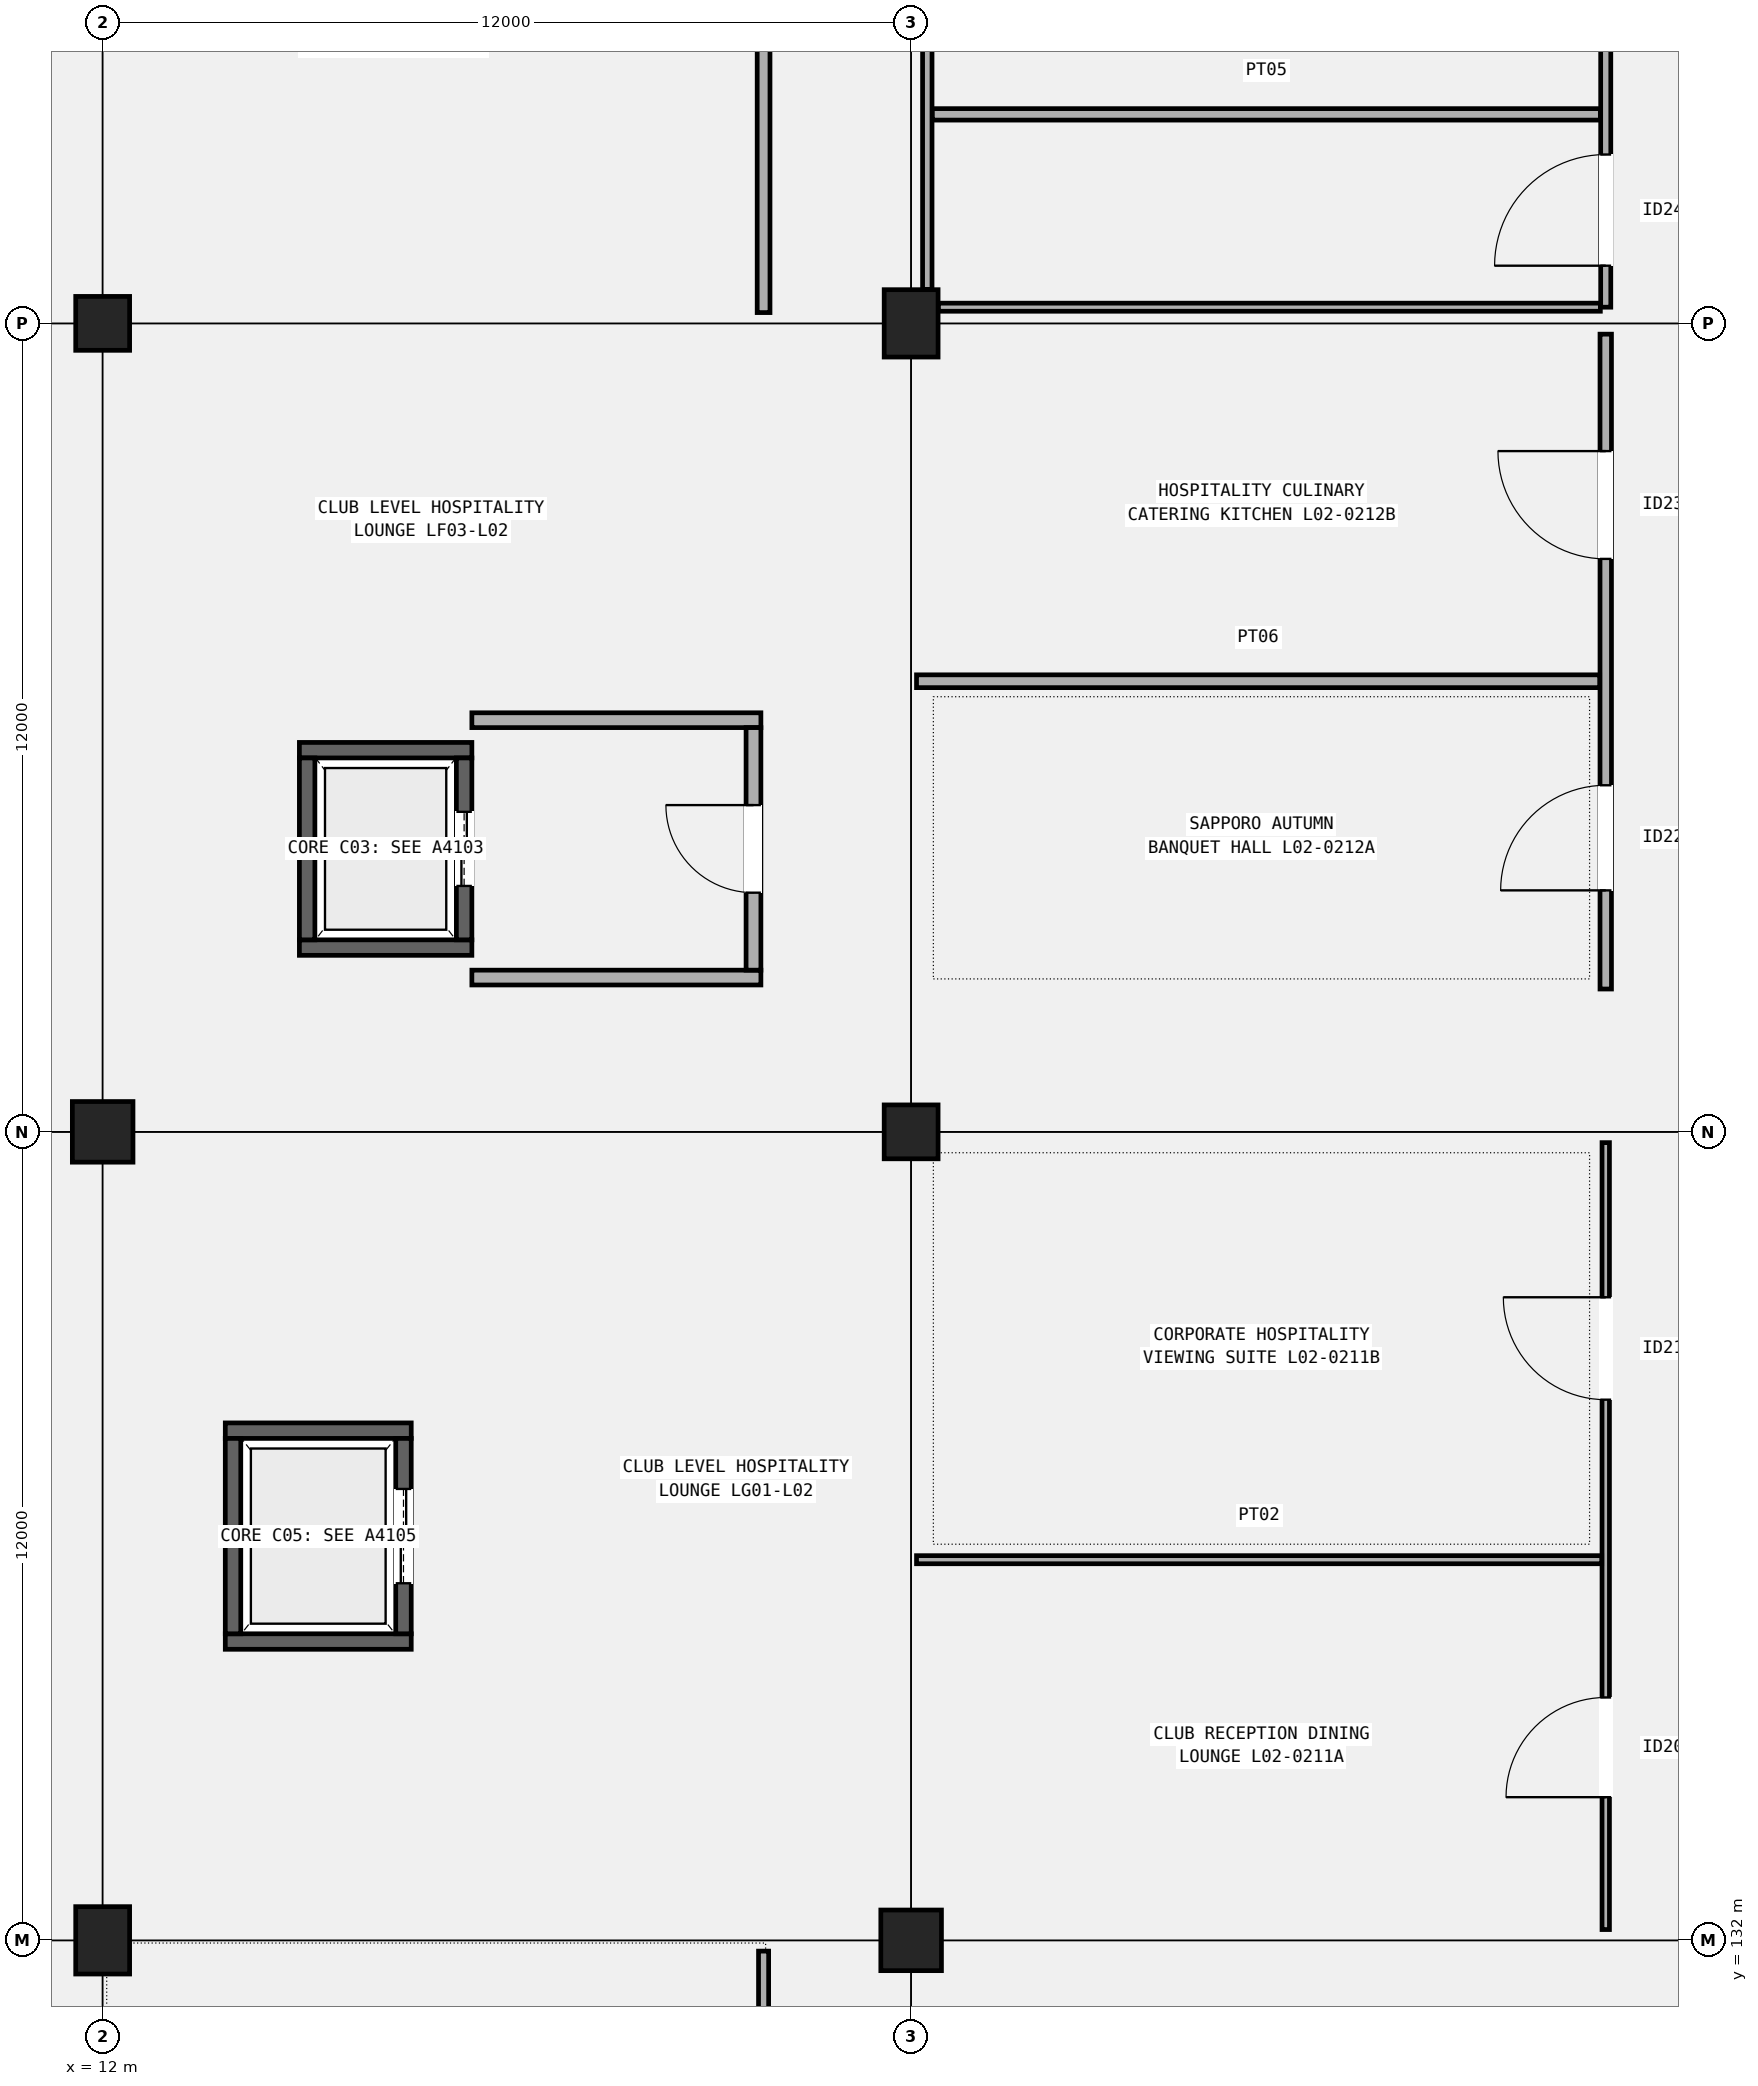
"""IFC4 building model, lengths in metres.
Left out: names, types, materials, properties, quantities, classifications, styles, units other than length and angle.
Written with IfcOpenShell. Run it as: python <this file> out.ifc"""

import sys

from ifc_helpers import new_model, si_unit, direction, frame, frame_2d, origin, origin_2d, place, context, subcontext, project, spatial, rectangle, extrude, element, fill, save


model = new_model("IFC4")
c1 = context("Model", 3, precision=1e-05, world=origin(), true_north=direction((0.0, 1.0)))
c2 = subcontext(c1, "Body", "Model", "MODEL_VIEW")
j1 = project(units=[si_unit("LENGTHUNIT", "METRE"), si_unit("PLANEANGLEUNIT", "RADIAN")], contexts=[c1])
p1 = place(None, origin())
s1 = spatial("IfcSite", under=j1, at=p1, CompositionType="ELEMENT")
p2 = place(p1, origin())
s2 = spatial("IfcBuilding", under=s1, at=p2, CompositionType="ELEMENT")
p3 = place(p2, frame((0.0, 0.0, 10.2)))
s3 = spatial("IfcBuildingStorey", under=s2, at=p3, CompositionType="ELEMENT", Elevation=10.2)
p4 = place(p3, frame((12.0, 132.0, 0.0), z_axis=(0.0, 0.0, 1.0), x_axis=(1.0, 0.0, 0.0)))
e1 = element("IfcColumn", 1, at=p4, inside=s3, PredefinedType="COLUMN", context=c2, shape_type="SweptSolid", body=[
    extrude(rectangle(XDim=0.8, YDim=1.0, at=origin_2d()), origin(), (0.0, 0.0, 1.0), 5.1),
])
p5 = place(p3, frame((12.0, 144.0, 0.0), z_axis=(0.0, 0.0, 1.0), x_axis=(1.0, 0.0, 0.0)))
e2 = element("IfcColumn", 2, at=p5, inside=s3, PredefinedType="COLUMN", context=c2, shape_type="SweptSolid", body=[
    extrude(rectangle(XDim=0.9, YDim=0.9, at=origin_2d()), origin(), (0.0, 0.0, 1.0), 5.1),
])
p6 = place(p3, frame((12.0, 156.0, 0.0), z_axis=(0.0, 0.0, 1.0), x_axis=(1.0, 0.0, 0.0)))
e3 = element("IfcColumn", 3, at=p6, inside=s3, PredefinedType="COLUMN", context=c2, shape_type="SweptSolid", body=[
    extrude(rectangle(XDim=0.8, YDim=0.8, at=origin_2d()), origin(), (0.0, 0.0, 1.0), 5.1),
])
p7 = place(p3, frame((24.0, 132.0, 0.0), z_axis=(0.0, 0.0, 1.0), x_axis=(1.0, 0.0, 0.0)))
e4 = element("IfcColumn", 4, at=p7, inside=s3, PredefinedType="COLUMN", context=c2, shape_type="SweptSolid", body=[
    extrude(rectangle(XDim=0.9, YDim=0.9, at=origin_2d()), origin(), (0.0, 0.0, 1.0), 5.1),
])
p8 = place(p3, frame((24.0, 144.0, 0.0), z_axis=(0.0, 0.0, 1.0), x_axis=(1.0, 0.0, 0.0)))
e5 = element("IfcColumn", 5, at=p8, inside=s3, PredefinedType="COLUMN", context=c2, shape_type="SweptSolid", body=[
    extrude(rectangle(XDim=0.8, YDim=0.8, at=origin_2d()), origin(), (0.0, 0.0, 1.0), 5.1),
])
p9 = place(p3, frame((24.0, 156.0, 0.0), z_axis=(0.0, 0.0, 1.0), x_axis=(1.0, 0.0, 0.0)))
e6 = element("IfcColumn", 6, at=p9, inside=s3, PredefinedType="COLUMN", context=c2, shape_type="SweptSolid", body=[
    extrude(rectangle(XDim=0.8, YDim=1.0, at=origin_2d()), origin(), (0.0, 0.0, 1.0), 5.1),
])
for number, where, z_axis, x_axis in (
    (7, (14.92, 146.735, 0.0), (0.0, 0.0, 1.0), (1.0, 0.0, 0.0)),
    (8, (14.92, 149.665, 0.0), (0.0, 0.0, 1.0), (1.0, 0.0, 0.0)),
):
    element("IfcWall", number, at=place(p3, frame(where, z_axis=z_axis, x_axis=x_axis)), inside=s3, PredefinedType="SHEAR", context=c2, shape_type="SweptSolid", body=[
        extrude(rectangle(XDim=2.56, YDim=0.23, at=frame_2d((1.28, 0.0))), origin(), (0.0, 0.0, 1.0), 4.82),
    ])
p10 = place(p3, frame((15.035, 146.85, 0.0), z_axis=(0.0, 0.0, 1.0), x_axis=(0.0, 1.0, 0.0)))
e9 = element("IfcWall", 9, at=p10, inside=s3, PredefinedType="SHEAR", context=c2, shape_type="SweptSolid", body=[
    extrude(rectangle(XDim=2.7, YDim=0.23, at=frame_2d((1.35, 0.0))), origin(), (0.0, 0.0, 1.0), 4.82),
])
p11 = place(p3, frame((17.365, 146.85, 0.0), z_axis=(0.0, 0.0, 1.0), x_axis=(0.0, 1.0, 0.0)))
e10 = element("IfcWall", 10, at=p11, inside=s3, PredefinedType="SHEAR", context=c2, shape_type="SweptSolid", body=[
    extrude(rectangle(XDim=2.7, YDim=0.23, at=frame_2d((1.35, 0.0))), origin(), (0.0, 0.0, 1.0), 4.82),
])
p12 = place(p11, frame((0.8, 0.0, 0.0)))
e11 = element("IfcOpeningElement", 11, at=p12, cuts=e10, PredefinedType="OPENING", context=c2, shape_type="SweptSolid", body=[
    extrude(rectangle(XDim=1.1, YDim=2.15, at=frame_2d((0.55, 1.075))), frame((0.0, 0.125, 0.0), z_axis=(0.0, -1.0, 0.0), x_axis=(1.0, 0.0, 0.0)), (0.0, 0.0, 1.0), 0.25),
])
for number, where, z_axis, x_axis in (
    (12, (17.48, 146.29, 0.0), (0.0, 0.0, 1.0), (1.0, 0.0, 0.0)),
    (13, (17.48, 150.11, 0.0), (0.0, 0.0, 1.0), (1.0, 0.0, 0.0)),
):
    element("IfcWall", number, at=place(p3, frame(where, z_axis=z_axis, x_axis=x_axis)), inside=s3, PredefinedType="SOLIDWALL", context=c2, shape_type="SweptSolid", body=[
        extrude(rectangle(XDim=4.29, YDim=0.22, at=frame_2d((2.145, 0.0))), origin(), (0.0, 0.0, 1.0), 4.22),
    ])
p13 = place(p3, frame((21.66, 146.4, 0.0), z_axis=(0.0, 0.0, 1.0), x_axis=(0.0, 1.0, 0.0)))
e14 = element("IfcWall", 14, at=p13, inside=s3, PredefinedType="SOLIDWALL", context=c2, shape_type="SweptSolid", body=[
    extrude(rectangle(XDim=3.6, YDim=0.22, at=frame_2d((1.8, 0.0))), origin(), (0.0, 0.0, 1.0), 4.22),
])
p14 = place(p13, frame((1.15, 0.0, 0.0)))
e15 = element("IfcOpeningElement", 15, at=p14, cuts=e14, PredefinedType="OPENING", context=c2, shape_type="SweptSolid", body=[
    extrude(rectangle(XDim=1.3, YDim=2.15, at=frame_2d((0.65, 1.075))), frame((0.0, 0.12, 0.0), z_axis=(0.0, -1.0, 0.0), x_axis=(1.0, 0.0, 0.0)), (0.0, 0.0, 1.0), 0.24),
])
for number, where, z_axis, x_axis in (
    (16, (13.82, 136.435, 0.0), (0.0, 0.0, 1.0), (1.0, 0.0, 0.0)),
    (17, (13.82, 139.565, 0.0), (0.0, 0.0, 1.0), (1.0, 0.0, 0.0)),
):
    element("IfcWall", number, at=place(p3, frame(where, z_axis=z_axis, x_axis=x_axis)), inside=s3, PredefinedType="SHEAR", context=c2, shape_type="SweptSolid", body=[
        extrude(rectangle(XDim=2.76, YDim=0.23, at=frame_2d((1.38, 0.0))), origin(), (0.0, 0.0, 1.0), 4.82),
    ])
p15 = place(p3, frame((13.935, 136.55, 0.0), z_axis=(0.0, 0.0, 1.0), x_axis=(0.0, 1.0, 0.0)))
e18 = element("IfcWall", 18, at=p15, inside=s3, PredefinedType="SHEAR", context=c2, shape_type="SweptSolid", body=[
    extrude(rectangle(XDim=2.9, YDim=0.23, at=frame_2d((1.45, 0.0))), origin(), (0.0, 0.0, 1.0), 4.82),
])
p16 = place(p3, frame((16.465, 136.55, 0.0), z_axis=(0.0, 0.0, 1.0), x_axis=(0.0, 1.0, 0.0)))
e19 = element("IfcWall", 19, at=p16, inside=s3, PredefinedType="SHEAR", context=c2, shape_type="SweptSolid", body=[
    extrude(rectangle(XDim=2.9, YDim=0.23, at=frame_2d((1.45, 0.0))), origin(), (0.0, 0.0, 1.0), 4.82),
])
p17 = place(p16, frame((0.75, 0.0, 0.0)))
e20 = element("IfcOpeningElement", 20, at=p17, cuts=e19, PredefinedType="OPENING", context=c2, shape_type="SweptSolid", body=[
    extrude(rectangle(XDim=1.4, YDim=2.25, at=frame_2d((0.7, 1.125))), frame((0.0, 0.125, 0.0), z_axis=(0.0, -1.0, 0.0), x_axis=(1.0, 0.0, 0.0)), (0.0, 0.0, 1.0), 0.25),
])
p18 = place(p3, frame((21.81, 120.16, 0.0), z_axis=(0.0, 0.0, 1.0), x_axis=(0.0, 1.0, 0.0)))
e21 = element("IfcWall", 21, at=p18, inside=s3, PredefinedType="PARTITIONING", context=c2, shape_type="SweptSolid", body=[
    extrude(rectangle(XDim=11.68, YDim=0.15, at=frame_2d((5.84, 0.0))), origin(), (0.0, 0.0, 1.0), 4.22),
])
p19 = place(p18, frame((5.35, 0.0, 0.0)))
e22 = element("IfcOpeningElement", 22, at=p19, cuts=e21, PredefinedType="OPENING", context=c2, shape_type="SweptSolid", body=[
    extrude(rectangle(XDim=0.98, YDim=2.1, at=frame_2d((0.49, 1.05))), frame((0.0, 0.085, 0.0), z_axis=(0.0, -1.0, 0.0), x_axis=(1.0, 0.0, 0.0)), (0.0, 0.0, 1.0), 0.17),
])
p20 = place(p3, frame((21.81, 156.16, 0.0), z_axis=(0.0, 0.0, 1.0), x_axis=(0.0, 1.0, 0.0)))
e23 = element("IfcWall", 23, at=p20, inside=s3, PredefinedType="PARTITIONING", context=c2, shape_type="SweptSolid", body=[
    extrude(rectangle(XDim=11.816, YDim=0.19, at=frame_2d((5.908, 0.0))), origin(), (0.0, 0.0, 1.0), 4.22),
])
p21 = place(p20, frame((5.34, 0.0, 0.0)))
e24 = element("IfcOpeningElement", 24, at=p21, cuts=e23, PredefinedType="OPENING", context=c2, shape_type="SweptSolid", body=[
    extrude(rectangle(XDim=1.0, YDim=2.14, at=frame_2d((0.5, 1.07))), frame((0.0, 0.105, 0.0), z_axis=(0.0, -1.0, 0.0), x_axis=(1.0, 0.0, 0.0)), (0.0, 0.0, 1.0), 0.21),
])
p22 = place(p3, frame((34.31, 132.16, 0.0), z_axis=(0.0, 0.0, 1.0), x_axis=(0.0, 1.0, 0.0)))
e25 = element("IfcWall", 25, at=p22, inside=s3, PredefinedType="PARTITIONING", context=c2, shape_type="SweptSolid", body=[
    extrude(rectangle(XDim=11.68, YDim=0.11, at=frame_2d((5.84, 0.0))), origin(), (0.0, 0.0, 1.0), 4.22),
])
p23 = place(p22, frame((1.965, 0.0, 0.0)))
e26 = element("IfcOpeningElement", 26, at=p23, cuts=e25, PredefinedType="OPENING", context=c2, shape_type="SweptSolid", body=[
    extrude(rectangle(XDim=1.48, YDim=2.24, at=frame_2d((0.74, 1.12))), frame((0.0, 0.065, 0.0), z_axis=(0.0, -1.0, 0.0), x_axis=(1.0, 0.0, 0.0)), (0.0, 0.0, 1.0), 0.13),
])
p24 = place(p22, frame((7.865, 0.0, 0.0)))
e27 = element("IfcOpeningElement", 27, at=p24, cuts=e25, PredefinedType="OPENING", context=c2, shape_type="SweptSolid", body=[
    extrude(rectangle(XDim=1.52, YDim=2.28, at=frame_2d((0.76, 1.14))), frame((0.0, 0.065, 0.0), z_axis=(0.0, -1.0, 0.0), x_axis=(1.0, 0.0, 0.0)), (0.0, 0.0, 1.0), 0.13),
])
p25 = place(p3, frame((24.08, 137.65, 0.0), z_axis=(0.0, 0.0, 1.0), x_axis=(1.0, 0.0, 0.0)))
e28 = element("IfcWall", 28, at=p25, inside=s3, PredefinedType="PARTITIONING", context=c2, shape_type="SweptSolid", body=[
    extrude(rectangle(XDim=10.17, YDim=0.12, at=frame_2d((5.085, 0.0))), origin(), (0.0, 0.0, 1.0), 4.22),
])
p26 = place(p3, frame((34.31, 146.12, 0.0), z_axis=(0.0, 0.0, 1.0), x_axis=(0.0, 1.0, 0.0)))
e29 = element("IfcWall", 29, at=p26, inside=s3, PredefinedType="PARTITIONING", context=c2, shape_type="SweptSolid", body=[
    extrude(rectangle(XDim=9.72, YDim=0.17, at=frame_2d((4.86, 0.0))), origin(), (0.0, 0.0, 1.0), 4.22),
])
p27 = place(p26, frame((1.464, 0.0, 0.0)))
e30 = element("IfcOpeningElement", 30, at=p27, cuts=e29, PredefinedType="OPENING", context=c2, shape_type="SweptSolid", body=[
    extrude(rectangle(XDim=1.56, YDim=2.26, at=frame_2d((0.78, 1.13))), frame((0.0, 0.095, 0.0), z_axis=(0.0, -1.0, 0.0), x_axis=(1.0, 0.0, 0.0)), (0.0, 0.0, 1.0), 0.19),
])
p28 = place(p26, frame((6.384, 0.0, 0.0)))
e31 = element("IfcOpeningElement", 31, at=p28, cuts=e29, PredefinedType="OPENING", context=c2, shape_type="SweptSolid", body=[
    extrude(rectangle(XDim=1.6, YDim=2.3, at=frame_2d((0.8, 1.15))), frame((0.0, 0.095, 0.0), z_axis=(0.0, -1.0, 0.0), x_axis=(1.0, 0.0, 0.0)), (0.0, 0.0, 1.0), 0.19),
])
p29 = place(p3, frame((24.08, 150.688, 0.0), z_axis=(0.0, 0.0, 1.0), x_axis=(1.0, 0.0, 0.0)))
e32 = element("IfcWall", 32, at=p29, inside=s3, PredefinedType="PARTITIONING", context=c2, shape_type="SweptSolid", body=[
    extrude(rectangle(XDim=10.14, YDim=0.19, at=frame_2d((5.07, 0.0))), origin(), (0.0, 0.0, 1.0), 4.22),
])
p30 = place(p3, frame((34.31, 156.24, 0.0), z_axis=(0.0, 0.0, 1.0), x_axis=(0.0, 1.0, 0.0)))
e33 = element("IfcWall", 33, at=p30, inside=s3, PredefinedType="PARTITIONING", context=c2, shape_type="SweptSolid", body=[
    extrude(rectangle(XDim=11.736, YDim=0.15, at=frame_2d((5.868, 0.0))), origin(), (0.0, 0.0, 1.0), 4.22),
])
p31 = place(p30, frame((0.616, 0.0, 0.0)))
e34 = element("IfcOpeningElement", 34, at=p31, cuts=e33, PredefinedType="OPENING", context=c2, shape_type="SweptSolid", body=[
    extrude(rectangle(XDim=1.65, YDim=2.28, at=frame_2d((0.825, 1.14))), frame((0.0, 0.085, 0.0), z_axis=(0.0, -1.0, 0.0), x_axis=(1.0, 0.0, 0.0)), (0.0, 0.0, 1.0), 0.17),
])
p32 = place(p30, frame((4.192, 0.0, 0.0)))
e35 = element("IfcOpeningElement", 35, at=p32, cuts=e33, PredefinedType="OPENING", context=c2, shape_type="SweptSolid", body=[
    extrude(rectangle(XDim=1.7, YDim=2.32, at=frame_2d((0.85, 1.16))), frame((0.0, 0.085, 0.0), z_axis=(0.0, -1.0, 0.0), x_axis=(1.0, 0.0, 0.0)), (0.0, 0.0, 1.0), 0.17),
])
p33 = place(p30, frame((8.48, 0.0, 0.0)))
e36 = element("IfcOpeningElement", 36, at=p33, cuts=e33, PredefinedType="OPENING", context=c2, shape_type="SweptSolid", body=[
    extrude(rectangle(XDim=1.76, YDim=2.3, at=frame_2d((0.88, 1.15))), frame((0.0, 0.085, 0.0), z_axis=(0.0, -1.0, 0.0), x_axis=(1.0, 0.0, 0.0)), (0.0, 0.0, 1.0), 0.17),
])
p34 = place(p3, frame((24.404, 156.24, 0.0), z_axis=(0.0, 0.0, 1.0), x_axis=(1.0, 0.0, 0.0)))
e37 = element("IfcWall", 37, at=p34, inside=s3, PredefinedType="PARTITIONING", context=c2, shape_type="SweptSolid", body=[
    extrude(rectangle(XDim=9.826, YDim=0.12, at=frame_2d((4.913, 0.0))), origin(), (0.0, 0.0, 1.0), 3.98),
])
p35 = place(p3, frame((24.24, 156.504, 0.0), z_axis=(0.0, 0.0, 1.0), x_axis=(0.0, 1.0, 0.0)))
e38 = element("IfcWall", 38, at=p35, inside=s3, PredefinedType="PARTITIONING", context=c2, shape_type="SweptSolid", body=[
    extrude(rectangle(XDim=11.042, YDim=0.14, at=frame_2d((5.521, 0.0))), origin(), (0.0, 0.0, 1.0), 3.98),
])
p36 = place(p3, frame((24.315, 159.102, 0.0), z_axis=(0.0, 0.0, 1.0), x_axis=(1.0, 0.0, 0.0)))
e39 = element("IfcWall", 39, at=p36, inside=s3, PredefinedType="PARTITIONING", context=c2, shape_type="SweptSolid", body=[
    extrude(rectangle(XDim=9.915, YDim=0.17, at=frame_2d((4.958, 0.0))), origin(), (0.0, 0.0, 1.0), 4.22),
])
p37 = place(p12, origin())
e40 = element("IfcDoor", 40, at=p37, inside=s3, OperationType="DOUBLE_DOOR_SLIDING", PredefinedType="DOOR", context=c2, shape_type="SweptSolid", body=[
    extrude(rectangle(XDim=1.1, YDim=2.15, at=frame_2d((0.55, 1.075))), frame((0.0, 0.025, 0.0), z_axis=(0.0, -1.0, 0.0), x_axis=(1.0, 0.0, 0.0)), (0.0, 0.0, 1.0), 0.05),
])
fill(e11, e40)
p38 = place(p14, origin())
e41 = element("IfcDoor", 41, at=p38, inside=s3, OperationType="SINGLE_SWING_RIGHT", PredefinedType="DOOR", context=c2, shape_type="SweptSolid", body=[
    extrude(rectangle(XDim=1.3, YDim=2.15, at=frame_2d((0.65, 1.075))), frame((0.0, 0.025, 0.0), z_axis=(0.0, -1.0, 0.0), x_axis=(1.0, 0.0, 0.0)), (0.0, 0.0, 1.0), 0.05),
])
fill(e15, e41)
p39 = place(p17, origin())
e42 = element("IfcDoor", 42, at=p39, inside=s3, OperationType="DOUBLE_DOOR_SLIDING", PredefinedType="DOOR", context=c2, shape_type="SweptSolid", body=[
    extrude(rectangle(XDim=1.4, YDim=2.25, at=frame_2d((0.7, 1.125))), frame((0.0, 0.025, 0.0), z_axis=(0.0, -1.0, 0.0), x_axis=(1.0, 0.0, 0.0)), (0.0, 0.0, 1.0), 0.05),
])
fill(e20, e42)
p40 = place(p23, origin())
e43 = element("IfcDoor", 43, at=p40, inside=s3, OperationType="SINGLE_SWING_LEFT", PredefinedType="DOOR", context=c2, shape_type="SweptSolid", body=[
    extrude(rectangle(XDim=1.48, YDim=2.24, at=frame_2d((0.74, 1.12))), frame((0.0, 0.025, 0.0), z_axis=(0.0, -1.0, 0.0), x_axis=(1.0, 0.0, 0.0)), (0.0, 0.0, 1.0), 0.05),
])
fill(e26, e43)
p41 = place(p24, origin())
e44 = element("IfcDoor", 44, at=p41, inside=s3, OperationType="SINGLE_SWING_RIGHT", PredefinedType="DOOR", context=c2, shape_type="SweptSolid", body=[
    extrude(rectangle(XDim=1.52, YDim=2.28, at=frame_2d((0.76, 1.14))), frame((0.0, 0.025, 0.0), z_axis=(0.0, -1.0, 0.0), x_axis=(1.0, 0.0, 0.0)), (0.0, 0.0, 1.0), 0.05),
])
fill(e27, e44)
p42 = place(p27, origin())
e45 = element("IfcDoor", 45, at=p42, inside=s3, OperationType="SINGLE_SWING_LEFT", PredefinedType="DOOR", context=c2, shape_type="SweptSolid", body=[
    extrude(rectangle(XDim=1.56, YDim=2.26, at=frame_2d((0.78, 1.13))), frame((0.0, 0.025, 0.0), z_axis=(0.0, -1.0, 0.0), x_axis=(1.0, 0.0, 0.0)), (0.0, 0.0, 1.0), 0.05),
])
fill(e30, e45)
p43 = place(p28, origin())
e46 = element("IfcDoor", 46, at=p43, inside=s3, OperationType="SINGLE_SWING_RIGHT", PredefinedType="DOOR", context=c2, shape_type="SweptSolid", body=[
    extrude(rectangle(XDim=1.6, YDim=2.3, at=frame_2d((0.8, 1.15))), frame((0.0, 0.025, 0.0), z_axis=(0.0, -1.0, 0.0), x_axis=(1.0, 0.0, 0.0)), (0.0, 0.0, 1.0), 0.05),
])
fill(e31, e46)
p44 = place(p31, origin())
e47 = element("IfcDoor", 47, at=p44, inside=s3, OperationType="SINGLE_SWING_LEFT", PredefinedType="DOOR", context=c2, shape_type="SweptSolid", body=[
    extrude(rectangle(XDim=1.65, YDim=2.28, at=frame_2d((0.825, 1.14))), frame((0.0, 0.025, 0.0), z_axis=(0.0, -1.0, 0.0), x_axis=(1.0, 0.0, 0.0)), (0.0, 0.0, 1.0), 0.05),
])
fill(e34, e47)
save(model, sys.argv[1])
